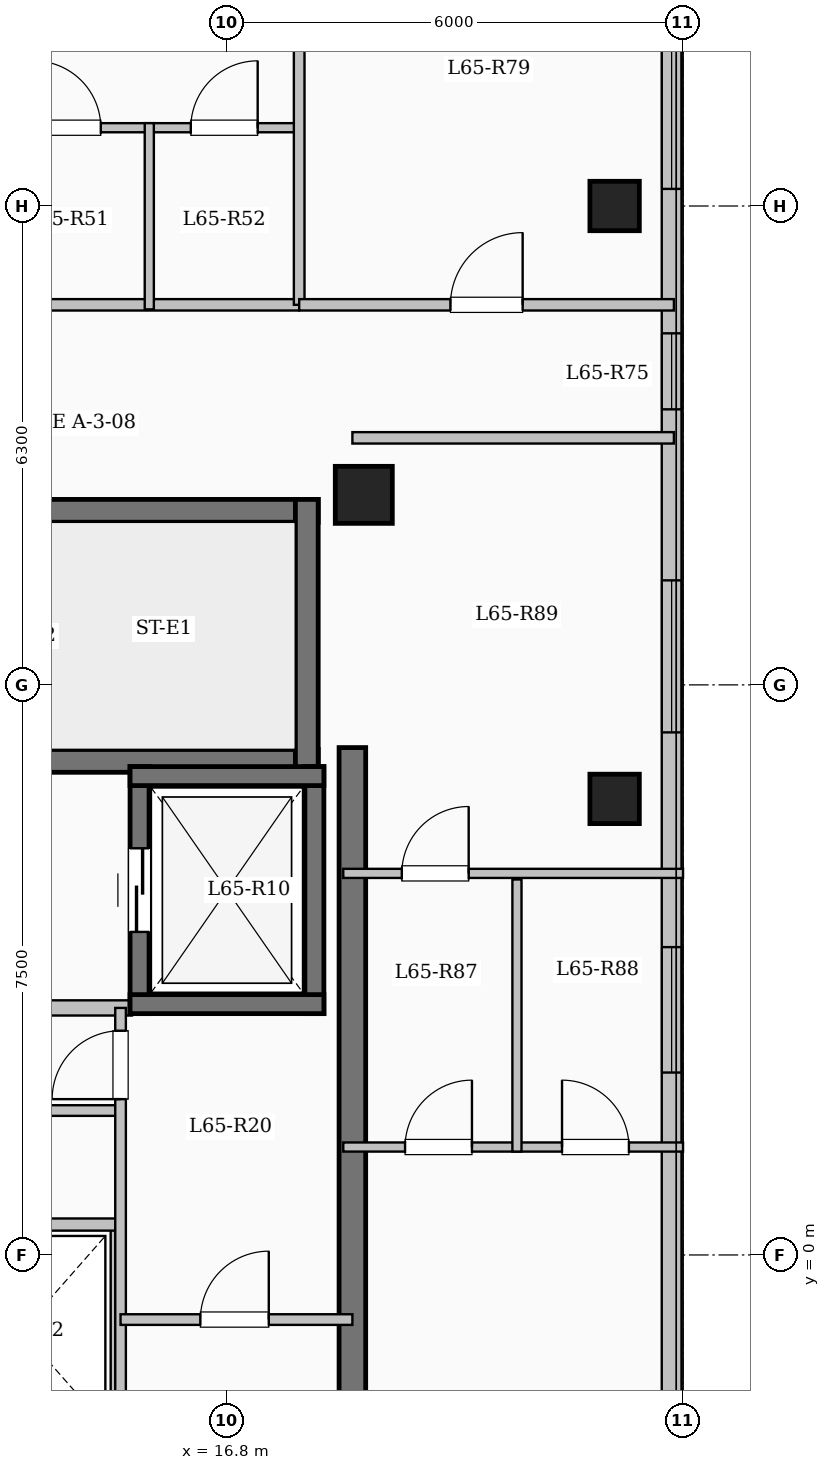
"""IFC4 building model, lengths in metres.
Left out: names, types, materials, properties, quantities, classifications, styles, units other than length and angle.
Written with IfcOpenShell. Run it as: python <this file> out.ifc"""

import sys

from ifc_helpers import new_model, si_unit, direction, frame, frame_2d, origin, origin_2d, place, context, subcontext, project, spatial, rectangle, extrude, element, fill, save


model = new_model("IFC4")
c1 = context("Model", 3, precision=1e-05, world=origin(), true_north=direction((0.0, 1.0)))
c2 = subcontext(c1, "Body", "Model", "MODEL_VIEW")
j1 = project(units=[si_unit("LENGTHUNIT", "METRE"), si_unit("PLANEANGLEUNIT", "RADIAN")], contexts=[c1])
p1 = place(None, origin())
s1 = spatial("IfcSite", under=j1, at=p1, CompositionType="ELEMENT")
p2 = place(p1, origin())
s2 = spatial("IfcBuilding", under=s1, at=p2, CompositionType="ELEMENT")
p3 = place(p2, frame((0.0, 0.0, 241.5)))
s3 = spatial("IfcBuildingStorey", under=s2, at=p3, CompositionType="ELEMENT", Elevation=241.5)
p4 = place(p3, frame((18.6, 10.0, 0.0), z_axis=(0.0, 0.0, 1.0), x_axis=(1.0, 0.0, 0.0)))
e1 = element("IfcColumn", 1, at=p4, inside=s3, PredefinedType="COLUMN", context=c2, shape_type="SweptSolid", body=[
    extrude(rectangle(XDim=0.75, YDim=0.75, at=origin_2d()), origin(), (0.0, 0.0, 1.0), 3.35),
])
for number, where, z_axis, x_axis in (
    (2, (21.9, 6.0, 0.0), (0.0, 0.0, 1.0), (1.0, 0.0, 0.0)),
    (3, (21.9, 13.8, 0.0), (0.0, 0.0, 1.0), (1.0, 0.0, 0.0)),
):
    element("IfcColumn", number, at=place(p3, frame(where, z_axis=z_axis, x_axis=x_axis)), inside=s3, PredefinedType="COLUMN", context=c2, shape_type="SweptSolid", body=[
        extrude(rectangle(XDim=0.65, YDim=0.65, at=origin_2d()), origin(), (0.0, 0.0, 1.0), 3.35),
    ])
p5 = place(p3, frame((22.65, 17.55, 0.0), z_axis=(0.0, 0.0, 1.0), x_axis=(0.0, -1.0, 0.0)))
e4 = element("IfcWall", 4, at=p5, inside=s3, PredefinedType="SOLIDWALL", context=c2, shape_type="SweptSolid", body=[
    extrude(rectangle(XDim=35.1, YDim=0.26, at=frame_2d((17.55, 0.0))), origin(), (0.0, 0.0, 1.0), 3.1),
])
p6 = place(p5, frame((1.525, 0.0, 0.9)))
e5 = element("IfcOpeningElement", 5, at=p6, cuts=e4, PredefinedType="OPENING", context=c2, shape_type="SweptSolid", body=[
    extrude(rectangle(XDim=2.0, YDim=1.7, at=frame_2d((1.0, 0.85))), frame((0.0, 0.14, 0.0), z_axis=(0.0, -1.0, 0.0), x_axis=(1.0, 0.0, 0.0)), (0.0, 0.0, 1.0), 0.28),
])
p7 = place(p5, frame((5.425, 0.0, 0.95)))
e6 = element("IfcOpeningElement", 6, at=p7, cuts=e4, PredefinedType="OPENING", context=c2, shape_type="SweptSolid", body=[
    extrude(rectangle(XDim=1.0, YDim=1.5, at=frame_2d((0.5, 0.75))), frame((0.0, 0.14, 0.0), z_axis=(0.0, -1.0, 0.0), x_axis=(1.0, 0.0, 0.0)), (0.0, 0.0, 1.0), 0.28),
])
p8 = place(p5, frame((8.675, 0.0, 0.9)))
e7 = element("IfcOpeningElement", 7, at=p8, cuts=e4, PredefinedType="OPENING", context=c2, shape_type="SweptSolid", body=[
    extrude(rectangle(XDim=2.0, YDim=1.7, at=frame_2d((1.0, 0.85))), frame((0.0, 0.14, 0.0), z_axis=(0.0, -1.0, 0.0), x_axis=(1.0, 0.0, 0.0)), (0.0, 0.0, 1.0), 0.28),
])
p9 = place(p5, frame((13.5, 0.0, 0.9)))
e8 = element("IfcOpeningElement", 8, at=p9, cuts=e4, PredefinedType="OPENING", context=c2, shape_type="SweptSolid", body=[
    extrude(rectangle(XDim=1.65, YDim=1.6, at=frame_2d((0.825, 0.8))), frame((0.0, 0.14, 0.0), z_axis=(0.0, -1.0, 0.0), x_axis=(1.0, 0.0, 0.0)), (0.0, 0.0, 1.0), 0.28),
])
p10 = place(p5, frame((19.35, 0.0, 0.9)))
e9 = element("IfcOpeningElement", 9, at=p10, cuts=e4, PredefinedType="OPENING", context=c2, shape_type="SweptSolid", body=[
    extrude(rectangle(XDim=2.2, YDim=1.75, at=frame_2d((1.1, 0.875))), frame((0.0, 0.14, 0.0), z_axis=(0.0, -1.0, 0.0), x_axis=(1.0, 0.0, 0.0)), (0.0, 0.0, 1.0), 0.28),
])
p11 = place(p5, frame((25.275, 0.0, 0.95)))
e10 = element("IfcOpeningElement", 10, at=p11, cuts=e4, PredefinedType="OPENING", context=c2, shape_type="SweptSolid", body=[
    extrude(rectangle(XDim=1.2, YDim=1.5, at=frame_2d((0.6, 0.75))), frame((0.0, 0.14, 0.0), z_axis=(0.0, -1.0, 0.0), x_axis=(1.0, 0.0, 0.0)), (0.0, 0.0, 1.0), 0.28),
])
p12 = place(p5, frame((29.925, 0.0, 0.9)))
e11 = element("IfcOpeningElement", 11, at=p12, cuts=e4, PredefinedType="OPENING", context=c2, shape_type="SweptSolid", body=[
    extrude(rectangle(XDim=2.2, YDim=1.75, at=frame_2d((1.1, 0.875))), frame((0.0, 0.14, 0.0), z_axis=(0.0, -1.0, 0.0), x_axis=(1.0, 0.0, 0.0)), (0.0, 0.0, 1.0), 0.28),
])
p13 = place(p3, frame((10.0, 9.79, 0.0), z_axis=(0.0, 0.0, 1.0), x_axis=(1.0, 0.0, 0.0)))
e12 = element("IfcWall", 12, at=p13, inside=s3, PredefinedType="SHEAR", context=c2, shape_type="SweptSolid", body=[
    extrude(rectangle(XDim=8.0, YDim=0.3, at=frame_2d((4.0, 0.0))), origin(), (0.0, 0.0, 1.0), 3.35),
])
p14 = place(p3, frame((10.0, 6.5, 0.0), z_axis=(0.0, 0.0, 1.0), x_axis=(1.0, 0.0, 0.0)))
e13 = element("IfcWall", 13, at=p14, inside=s3, PredefinedType="SHEAR", context=c2, shape_type="SweptSolid", body=[
    extrude(rectangle(XDim=8.0, YDim=0.3, at=frame_2d((4.0, 0.0))), origin(), (0.0, 0.0, 1.0), 3.35),
])
p15 = place(p14, frame((0.55, 0.0, 0.0)))
e14 = element("IfcOpeningElement", 14, at=p15, cuts=e13, PredefinedType="OPENING", context=c2, shape_type="SweptSolid", body=[
    extrude(rectangle(XDim=1.0, YDim=2.15, at=frame_2d((0.5, 1.075))), frame((0.0, 0.16, 0.0), z_axis=(0.0, -1.0, 0.0), x_axis=(1.0, 0.0, 0.0)), (0.0, 0.0, 1.0), 0.32),
])
p16 = place(p3, frame((17.85, 6.35, 0.0), z_axis=(0.0, 0.0, 1.0), x_axis=(0.0, 1.0, 0.0)))
e15 = element("IfcWall", 15, at=p16, inside=s3, PredefinedType="SHEAR", context=c2, shape_type="SweptSolid", body=[
    extrude(rectangle(XDim=3.59, YDim=0.3, at=frame_2d((1.795, 0.0))), origin(), (0.0, 0.0, 1.0), 3.35),
])
p17 = place(p3, frame((10.15, 3.25, 0.0), z_axis=(0.0, 0.0, 1.0), x_axis=(1.0, 0.0, 0.0)))
e16 = element("IfcWall", 16, at=p17, inside=s3, PredefinedType="SOLIDWALL", context=c2, shape_type="SweptSolid", body=[
    extrude(rectangle(XDim=5.4, YDim=0.2, at=frame_2d((2.7, 0.0))), origin(), (0.0, 0.0, 1.0), 3.1),
])
p18 = place(p3, frame((15.65, 3.175, 0.0), z_axis=(0.0, 0.0, 1.0), x_axis=(0.0, 1.0, 0.0)))
e17 = element("IfcWall", 17, at=p18, inside=s3, PredefinedType="SHEAR", context=c2, shape_type="SweptSolid", body=[
    extrude(rectangle(XDim=3.25, YDim=0.25, at=frame_2d((1.625, 0.0))), origin(), (0.0, 0.0, 1.0), 3.35),
])
p19 = place(p18, frame((1.075, 0.0, 0.0)))
e18 = element("IfcOpeningElement", 18, at=p19, cuts=e17, PredefinedType="OPENING", context=c2, shape_type="SweptSolid", body=[
    extrude(rectangle(XDim=1.1, YDim=2.15, at=frame_2d((0.55, 1.075))), frame((0.0, 0.135, 0.0), z_axis=(0.0, -1.0, 0.0), x_axis=(1.0, 0.0, 0.0)), (0.0, 0.0, 1.0), 0.27),
])
p20 = place(p3, frame((17.95, 3.175, 0.0), z_axis=(0.0, 0.0, 1.0), x_axis=(0.0, 1.0, 0.0)))
e19 = element("IfcWall", 19, at=p20, inside=s3, PredefinedType="SHEAR", context=c2, shape_type="SweptSolid", body=[
    extrude(rectangle(XDim=3.25, YDim=0.25, at=frame_2d((1.625, 0.0))), origin(), (0.0, 0.0, 1.0), 3.35),
])
for number, where, z_axis, x_axis in (
    (20, (15.525, 3.3, 0.0), (0.0, 0.0, 1.0), (1.0, 0.0, 0.0)),
    (21, (15.525, 6.3, 0.0), (0.0, 0.0, 1.0), (1.0, 0.0, 0.0)),
):
    element("IfcWall", number, at=place(p3, frame(where, z_axis=z_axis, x_axis=x_axis)), inside=s3, PredefinedType="SHEAR", context=c2, shape_type="SweptSolid", body=[
        extrude(rectangle(XDim=2.55, YDim=0.25, at=frame_2d((1.275, 0.0))), origin(), (0.0, 0.0, 1.0), 3.35),
    ])
p21 = place(p3, frame((15.35, -2.4, 0.0), z_axis=(0.0, 0.0, 1.0), x_axis=(0.0, 1.0, 0.0)))
e22 = element("IfcWall", 22, at=p21, inside=s3, PredefinedType="SOLIDWALL", context=c2, shape_type="SweptSolid", body=[
    extrude(rectangle(XDim=2.8, YDim=0.16, at=frame_2d((1.4, 0.0))), origin(), (0.0, 0.0, 1.0), 3.1),
])
p22 = place(p3, frame((12.85, 0.4, 0.0), z_axis=(0.0, 0.0, 1.0), x_axis=(1.0, 0.0, 0.0)))
e23 = element("IfcWall", 23, at=p22, inside=s3, PredefinedType="SOLIDWALL", context=c2, shape_type="SweptSolid", body=[
    extrude(rectangle(XDim=2.5, YDim=0.16, at=frame_2d((1.25, 0.0))), origin(), (0.0, 0.0, 1.0), 3.1),
])
p23 = place(p3, frame((18.45, -7.375, 0.0), z_axis=(0.0, 0.0, 1.0), x_axis=(0.0, 1.0, 0.0)))
e24 = element("IfcWall", 24, at=p23, inside=s3, PredefinedType="SHEAR", context=c2, shape_type="SweptSolid", body=[
    extrude(rectangle(XDim=14.05, YDim=0.35, at=frame_2d((7.025, 0.0))), origin(), (0.0, 0.0, 1.0), 3.35),
])
p24 = place(p3, frame((12.8, 1.9, 0.0), z_axis=(0.0, 0.0, 1.0), x_axis=(1.0, 0.0, 0.0)))
e25 = element("IfcWall", 25, at=p24, inside=s3, PredefinedType="PARTITIONING", context=c2, shape_type="SweptSolid", body=[
    extrude(rectangle(XDim=2.6, YDim=0.14, at=frame_2d((1.3, 0.0))), origin(), (0.0, 0.0, 1.0), 3.1),
])
p25 = place(p3, frame((15.4, -7.2, 0.0), z_axis=(0.0, 0.0, 1.0), x_axis=(0.0, 1.0, 0.0)))
e26 = element("IfcWall", 26, at=p25, inside=s3, PredefinedType="PARTITIONING", context=c2, shape_type="SweptSolid", body=[
    extrude(rectangle(XDim=10.45, YDim=0.14, at=frame_2d((5.225, 0.0))), origin(), (0.0, 0.0, 1.0), 3.1),
])
p26 = place(p25, frame((9.25, 0.0, 0.0)))
e27 = element("IfcOpeningElement", 27, at=p26, cuts=e26, PredefinedType="OPENING", context=c2, shape_type="SweptSolid", body=[
    extrude(rectangle(XDim=0.9, YDim=2.08, at=frame_2d((0.45, 1.04))), frame((0.0, 0.08, 0.0), z_axis=(0.0, -1.0, 0.0), x_axis=(1.0, 0.0, 0.0)), (0.0, 0.0, 1.0), 0.16),
])
p27 = place(p3, frame((15.4, -0.85, 0.0), z_axis=(0.0, 0.0, 1.0), x_axis=(1.0, 0.0, 0.0)))
e28 = element("IfcWall", 28, at=p27, inside=s3, PredefinedType="PARTITIONING", context=c2, shape_type="SweptSolid", body=[
    extrude(rectangle(XDim=3.05, YDim=0.14, at=frame_2d((1.525, 0.0))), origin(), (0.0, 0.0, 1.0), 3.1),
])
p28 = place(p27, frame((1.05, 0.0, 0.0)))
e29 = element("IfcOpeningElement", 29, at=p28, cuts=e28, PredefinedType="OPENING", context=c2, shape_type="SweptSolid", body=[
    extrude(rectangle(XDim=0.9, YDim=2.08, at=frame_2d((0.45, 1.04))), frame((0.0, 0.08, 0.0), z_axis=(0.0, -1.0, 0.0), x_axis=(1.0, 0.0, 0.0)), (0.0, 0.0, 1.0), 0.16),
])
p29 = place(p3, frame((3.85, 12.5, 0.0), z_axis=(0.0, 0.0, 1.0), x_axis=(1.0, 0.0, 0.0)))
e30 = element("IfcWall", 30, at=p29, inside=s3, PredefinedType="PARTITIONING", context=c2, shape_type="SweptSolid", body=[
    extrude(rectangle(XDim=13.9, YDim=0.15, at=frame_2d((6.95, 0.0))), origin(), (0.0, 0.0, 1.0), 3.1),
])
p30 = place(p29, frame((0.7, 0.0, 0.0)))
e31 = element("IfcOpeningElement", 31, at=p30, cuts=e30, PredefinedType="OPENING", context=c2, shape_type="SweptSolid", body=[
    extrude(rectangle(XDim=0.96, YDim=2.15, at=frame_2d((0.48, 1.075))), frame((0.0, 0.085, 0.0), z_axis=(0.0, -1.0, 0.0), x_axis=(1.0, 0.0, 0.0)), (0.0, 0.0, 1.0), 0.17),
])
p31 = place(p29, frame((6.344, 0.0, 0.0)))
e32 = element("IfcOpeningElement", 32, at=p31, cuts=e30, PredefinedType="OPENING", context=c2, shape_type="SweptSolid", body=[
    extrude(rectangle(XDim=0.96, YDim=2.15, at=frame_2d((0.48, 1.075))), frame((0.0, 0.085, 0.0), z_axis=(0.0, -1.0, 0.0), x_axis=(1.0, 0.0, 0.0)), (0.0, 0.0, 1.0), 0.17),
])
p32 = place(p3, frame((13.622, 14.83, 0.0), z_axis=(0.0, 0.0, 1.0), x_axis=(1.0, 0.0, 0.0)))
e33 = element("IfcWall", 33, at=p32, inside=s3, PredefinedType="PARTITIONING", context=c2, shape_type="SweptSolid", body=[
    extrude(rectangle(XDim=2.156, YDim=0.12, at=frame_2d((1.078, 0.0))), origin(), (0.0, 0.0, 1.0), 3.1),
])
p33 = place(p32, frame((0.638, 0.0, 0.0)))
e34 = element("IfcOpeningElement", 34, at=p33, cuts=e33, PredefinedType="OPENING", context=c2, shape_type="SweptSolid", body=[
    extrude(rectangle(XDim=0.88, YDim=2.1, at=frame_2d((0.44, 1.05))), frame((0.0, 0.07, 0.0), z_axis=(0.0, -1.0, 0.0), x_axis=(1.0, 0.0, 0.0)), (0.0, 0.0, 1.0), 0.14),
])
p34 = place(p3, frame((15.778, 14.83, 0.0), z_axis=(0.0, 0.0, 1.0), x_axis=(1.0, 0.0, 0.0)))
e35 = element("IfcWall", 35, at=p34, inside=s3, PredefinedType="PARTITIONING", context=c2, shape_type="SweptSolid", body=[
    extrude(rectangle(XDim=1.972, YDim=0.12, at=frame_2d((0.986, 0.0))), origin(), (0.0, 0.0, 1.0), 3.1),
])
p35 = place(p34, frame((0.546, 0.0, 0.0)))
e36 = element("IfcOpeningElement", 36, at=p35, cuts=e35, PredefinedType="OPENING", context=c2, shape_type="SweptSolid", body=[
    extrude(rectangle(XDim=0.88, YDim=2.1, at=frame_2d((0.44, 1.05))), frame((0.0, 0.07, 0.0), z_axis=(0.0, -1.0, 0.0), x_axis=(1.0, 0.0, 0.0)), (0.0, 0.0, 1.0), 0.14),
])
p36 = place(p3, frame((15.778, 12.44, 0.0), z_axis=(0.0, 0.0, 1.0), x_axis=(0.0, 1.0, 0.0)))
e37 = element("IfcWall", 37, at=p36, inside=s3, PredefinedType="PARTITIONING", context=c2, shape_type="SweptSolid", body=[
    extrude(rectangle(XDim=2.45, YDim=0.12, at=frame_2d((1.225, 0.0))), origin(), (0.0, 0.0, 1.0), 3.1),
])
p37 = place(p3, frame((18.45, 10.75, 0.0), z_axis=(0.0, 0.0, 1.0), x_axis=(1.0, 0.0, 0.0)))
e38 = element("IfcWall", 38, at=p37, inside=s3, PredefinedType="PARTITIONING", context=c2, shape_type="SweptSolid", body=[
    extrude(rectangle(XDim=4.23, YDim=0.15, at=frame_2d((2.115, 0.0))), origin(), (0.0, 0.0, 1.0), 3.1),
])
p38 = place(p3, frame((17.75, 12.5, 0.0), z_axis=(0.0, 0.0, 1.0), x_axis=(0.0, 1.0, 0.0)))
e39 = element("IfcWall", 39, at=p38, inside=s3, PredefinedType="PARTITIONING", context=c2, shape_type="SweptSolid", body=[
    extrude(rectangle(XDim=5.05, YDim=0.14, at=frame_2d((2.525, 0.0))), origin(), (0.0, 0.0, 1.0), 3.1),
])
p39 = place(p3, frame((17.75, 12.5, 0.0), z_axis=(0.0, 0.0, 1.0), x_axis=(1.0, 0.0, 0.0)))
e40 = element("IfcWall", 40, at=p39, inside=s3, PredefinedType="PARTITIONING", context=c2, shape_type="SweptSolid", body=[
    extrude(rectangle(XDim=4.93, YDim=0.15, at=frame_2d((2.465, 0.0))), origin(), (0.0, 0.0, 1.0), 3.1),
])
p40 = place(p39, frame((1.99, 0.0, 0.0)))
e41 = element("IfcOpeningElement", 41, at=p40, cuts=e40, PredefinedType="OPENING", context=c2, shape_type="SweptSolid", body=[
    extrude(rectangle(XDim=0.95, YDim=2.15, at=frame_2d((0.475, 1.075))), frame((0.0, 0.085, 0.0), z_axis=(0.0, -1.0, 0.0), x_axis=(1.0, 0.0, 0.0)), (0.0, 0.0, 1.0), 0.17),
])
p41 = place(p3, frame((18.33, 1.42, 0.0), z_axis=(0.0, 0.0, 1.0), x_axis=(1.0, 0.0, 0.0)))
e42 = element("IfcWall", 42, at=p41, inside=s3, PredefinedType="PARTITIONING", context=c2, shape_type="SweptSolid", body=[
    extrude(rectangle(XDim=4.47, YDim=0.12, at=frame_2d((2.235, 0.0))), origin(), (0.0, 0.0, 1.0), 3.1),
])
p42 = place(p41, frame((0.813, 0.0, 0.0)))
e43 = element("IfcOpeningElement", 43, at=p42, cuts=e42, PredefinedType="OPENING", context=c2, shape_type="SweptSolid", body=[
    extrude(rectangle(XDim=0.88, YDim=2.1, at=frame_2d((0.44, 1.05))), frame((0.0, 0.07, 0.0), z_axis=(0.0, -1.0, 0.0), x_axis=(1.0, 0.0, 0.0)), (0.0, 0.0, 1.0), 0.14),
])
p43 = place(p41, frame((2.878, 0.0, 0.0)))
e44 = element("IfcOpeningElement", 44, at=p43, cuts=e42, PredefinedType="OPENING", context=c2, shape_type="SweptSolid", body=[
    extrude(rectangle(XDim=0.88, YDim=2.1, at=frame_2d((0.44, 1.05))), frame((0.0, 0.07, 0.0), z_axis=(0.0, -1.0, 0.0), x_axis=(1.0, 0.0, 0.0)), (0.0, 0.0, 1.0), 0.14),
])
p44 = place(p3, frame((18.33, 5.02, 0.0), z_axis=(0.0, 0.0, 1.0), x_axis=(1.0, 0.0, 0.0)))
e45 = element("IfcWall", 45, at=p44, inside=s3, PredefinedType="PARTITIONING", context=c2, shape_type="SweptSolid", body=[
    extrude(rectangle(XDim=4.47, YDim=0.12, at=frame_2d((2.235, 0.0))), origin(), (0.0, 0.0, 1.0), 3.1),
])
p45 = place(p44, frame((0.77, 0.0, 0.0)))
e46 = element("IfcOpeningElement", 46, at=p45, cuts=e45, PredefinedType="OPENING", context=c2, shape_type="SweptSolid", body=[
    extrude(rectangle(XDim=0.88, YDim=2.1, at=frame_2d((0.44, 1.05))), frame((0.0, 0.07, 0.0), z_axis=(0.0, -1.0, 0.0), x_axis=(1.0, 0.0, 0.0)), (0.0, 0.0, 1.0), 0.14),
])
p46 = place(p3, frame((20.615, 1.36, 0.0), z_axis=(0.0, 0.0, 1.0), x_axis=(0.0, 1.0, 0.0)))
e47 = element("IfcWall", 47, at=p46, inside=s3, PredefinedType="PARTITIONING", context=c2, shape_type="SweptSolid", body=[
    extrude(rectangle(XDim=3.58, YDim=0.12, at=frame_2d((1.79, 0.0))), origin(), (0.0, 0.0, 1.0), 3.1),
])
p47 = place(p6, origin())
e48 = element("IfcWindow", 48, at=p47, inside=s3, PartitioningType="SINGLE_PANEL", PredefinedType="WINDOW", context=c2, shape_type="SweptSolid", body=[
    extrude(rectangle(XDim=2.0, YDim=1.7, at=frame_2d((1.0, 0.85))), frame((0.0, 0.03, 0.0), z_axis=(0.0, -1.0, 0.0), x_axis=(1.0, 0.0, 0.0)), (0.0, 0.0, 1.0), 0.06),
])
fill(e5, e48)
p48 = place(p7, origin())
e49 = element("IfcWindow", 49, at=p48, inside=s3, PartitioningType="SINGLE_PANEL", PredefinedType="WINDOW", context=c2, shape_type="SweptSolid", body=[
    extrude(rectangle(XDim=1.0, YDim=1.5, at=frame_2d((0.5, 0.75))), frame((0.0, 0.03, 0.0), z_axis=(0.0, -1.0, 0.0), x_axis=(1.0, 0.0, 0.0)), (0.0, 0.0, 1.0), 0.06),
])
fill(e6, e49)
p49 = place(p8, origin())
e50 = element("IfcWindow", 50, at=p49, inside=s3, PartitioningType="SINGLE_PANEL", PredefinedType="WINDOW", context=c2, shape_type="SweptSolid", body=[
    extrude(rectangle(XDim=2.0, YDim=1.7, at=frame_2d((1.0, 0.85))), frame((0.0, 0.03, 0.0), z_axis=(0.0, -1.0, 0.0), x_axis=(1.0, 0.0, 0.0)), (0.0, 0.0, 1.0), 0.06),
])
fill(e7, e50)
p50 = place(p9, origin())
e51 = element("IfcWindow", 51, at=p50, inside=s3, PartitioningType="SINGLE_PANEL", PredefinedType="WINDOW", context=c2, shape_type="SweptSolid", body=[
    extrude(rectangle(XDim=1.65, YDim=1.6, at=frame_2d((0.825, 0.8))), frame((0.0, 0.03, 0.0), z_axis=(0.0, -1.0, 0.0), x_axis=(1.0, 0.0, 0.0)), (0.0, 0.0, 1.0), 0.06),
])
fill(e8, e51)
p51 = place(p19, origin())
e52 = element("IfcDoor", 52, at=p51, inside=s3, OperationType="SLIDING_TO_LEFT", PredefinedType="DOOR", context=c2, shape_type="SweptSolid", body=[
    extrude(rectangle(XDim=1.1, YDim=2.15, at=frame_2d((0.55, 1.075))), frame((0.0, 0.025, 0.0), z_axis=(0.0, -1.0, 0.0), x_axis=(1.0, 0.0, 0.0)), (0.0, 0.0, 1.0), 0.05),
])
fill(e18, e52)
p52 = place(p26, origin())
e53 = element("IfcDoor", 53, at=p52, inside=s3, OperationType="SINGLE_SWING_LEFT", PredefinedType="DOOR", context=c2, shape_type="SweptSolid", body=[
    extrude(rectangle(XDim=0.9, YDim=2.08, at=frame_2d((0.45, 1.04))), frame((0.0, 0.025, 0.0), z_axis=(0.0, -1.0, 0.0), x_axis=(1.0, 0.0, 0.0)), (0.0, 0.0, 1.0), 0.05),
])
fill(e27, e53)
p53 = place(p28, origin())
e54 = element("IfcDoor", 54, at=p53, inside=s3, OperationType="SINGLE_SWING_RIGHT", PredefinedType="DOOR", context=c2, shape_type="SweptSolid", body=[
    extrude(rectangle(XDim=0.9, YDim=2.08, at=frame_2d((0.45, 1.04))), frame((0.0, 0.025, 0.0), z_axis=(0.0, -1.0, 0.0), x_axis=(1.0, 0.0, 0.0)), (0.0, 0.0, 1.0), 0.05),
])
fill(e29, e54)
p54 = place(p33, origin())
e55 = element("IfcDoor", 55, at=p54, inside=s3, OperationType="SINGLE_SWING_LEFT", PredefinedType="DOOR", context=c2, shape_type="SweptSolid", body=[
    extrude(rectangle(XDim=0.88, YDim=2.1, at=frame_2d((0.44, 1.05))), frame((0.0, 0.025, 0.0), z_axis=(0.0, -1.0, 0.0), x_axis=(1.0, 0.0, 0.0)), (0.0, 0.0, 1.0), 0.05),
])
fill(e34, e55)
p55 = place(p35, origin())
e56 = element("IfcDoor", 56, at=p55, inside=s3, OperationType="SINGLE_SWING_RIGHT", PredefinedType="DOOR", context=c2, shape_type="SweptSolid", body=[
    extrude(rectangle(XDim=0.88, YDim=2.1, at=frame_2d((0.44, 1.05))), frame((0.0, 0.025, 0.0), z_axis=(0.0, -1.0, 0.0), x_axis=(1.0, 0.0, 0.0)), (0.0, 0.0, 1.0), 0.05),
])
fill(e36, e56)
p56 = place(p40, origin())
e57 = element("IfcDoor", 57, at=p56, inside=s3, OperationType="SINGLE_SWING_RIGHT", PredefinedType="DOOR", context=c2, shape_type="SweptSolid", body=[
    extrude(rectangle(XDim=0.95, YDim=2.15, at=frame_2d((0.475, 1.075))), frame((0.0, 0.025, 0.0), z_axis=(0.0, -1.0, 0.0), x_axis=(1.0, 0.0, 0.0)), (0.0, 0.0, 1.0), 0.05),
])
fill(e41, e57)
p57 = place(p42, origin())
e58 = element("IfcDoor", 58, at=p57, inside=s3, OperationType="SINGLE_SWING_RIGHT", PredefinedType="DOOR", context=c2, shape_type="SweptSolid", body=[
    extrude(rectangle(XDim=0.88, YDim=2.1, at=frame_2d((0.44, 1.05))), frame((0.0, 0.025, 0.0), z_axis=(0.0, -1.0, 0.0), x_axis=(1.0, 0.0, 0.0)), (0.0, 0.0, 1.0), 0.05),
])
fill(e43, e58)
p58 = place(p43, origin())
e59 = element("IfcDoor", 59, at=p58, inside=s3, OperationType="SINGLE_SWING_LEFT", PredefinedType="DOOR", context=c2, shape_type="SweptSolid", body=[
    extrude(rectangle(XDim=0.88, YDim=2.1, at=frame_2d((0.44, 1.05))), frame((0.0, 0.025, 0.0), z_axis=(0.0, -1.0, 0.0), x_axis=(1.0, 0.0, 0.0)), (0.0, 0.0, 1.0), 0.05),
])
fill(e44, e59)
p59 = place(p45, origin())
e60 = element("IfcDoor", 60, at=p59, inside=s3, OperationType="SINGLE_SWING_RIGHT", PredefinedType="DOOR", context=c2, shape_type="SweptSolid", body=[
    extrude(rectangle(XDim=0.88, YDim=2.1, at=frame_2d((0.44, 1.05))), frame((0.0, 0.025, 0.0), z_axis=(0.0, -1.0, 0.0), x_axis=(1.0, 0.0, 0.0)), (0.0, 0.0, 1.0), 0.05),
])
fill(e46, e60)
save(model, sys.argv[1])
